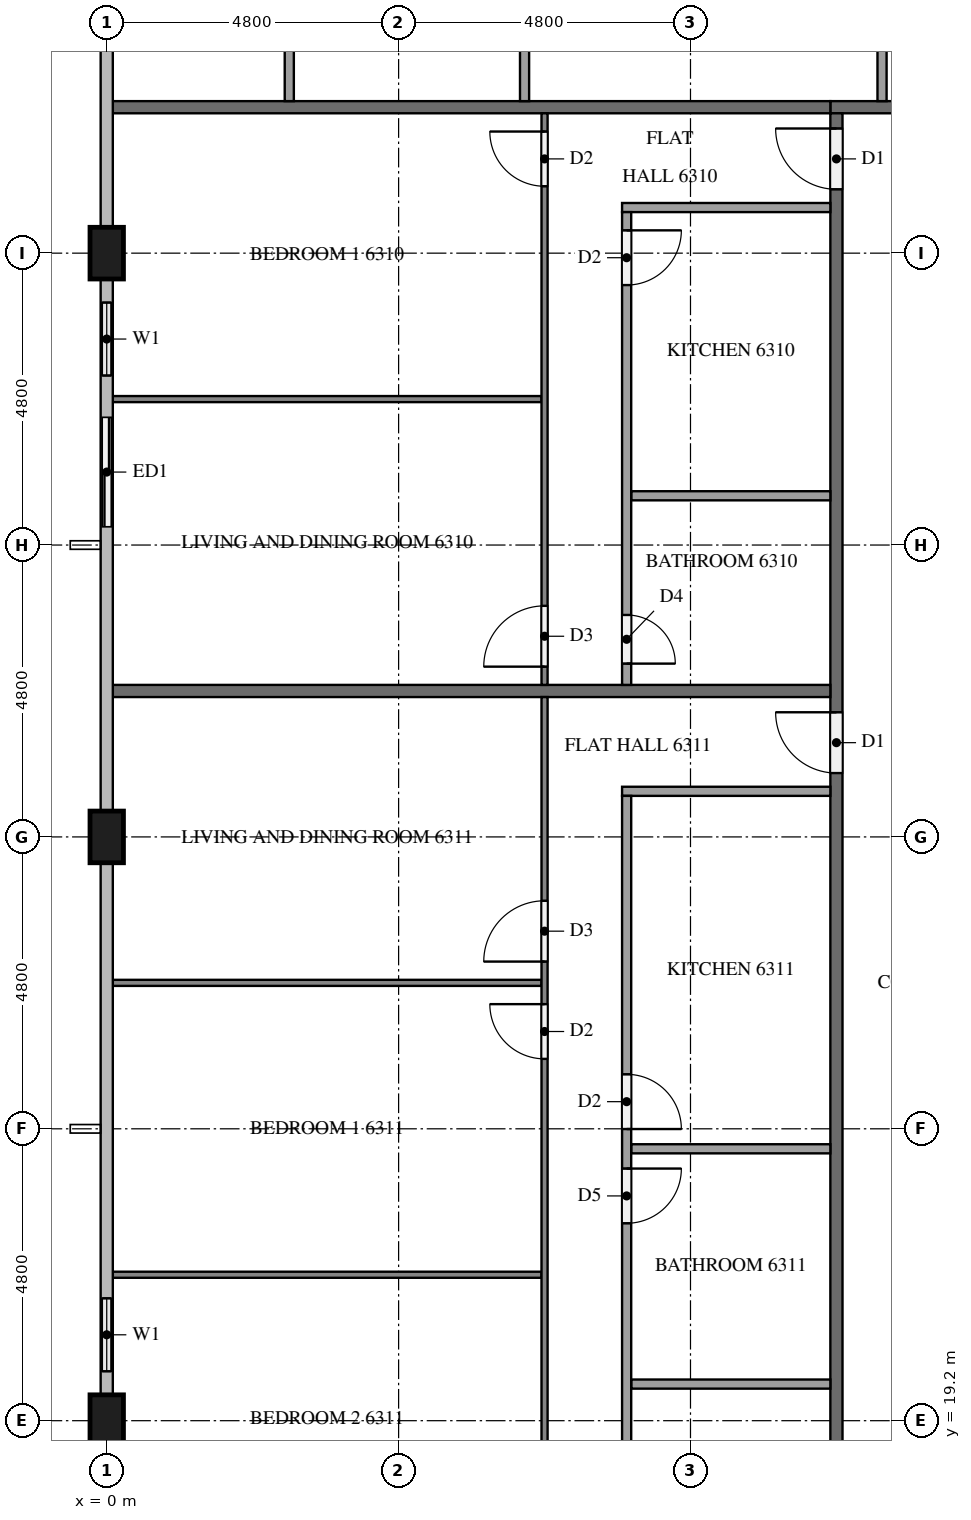
"""IFC4 building model, lengths in metres.
Left out: names, types, materials, properties, quantities, classifications, styles, units other than length and angle.
Written with IfcOpenShell. Run it as: python <this file> out.ifc"""

import sys

from ifc_helpers import new_model, si_unit, direction, frame, frame_2d, origin, origin_2d, place, context, subcontext, project, spatial, rectangle, extrude, element, fill, save


model = new_model("IFC4")
c1 = context("Model", 3, precision=1e-05, world=origin(), true_north=direction((0.0, 1.0)))
c2 = subcontext(c1, "Body", "Model", "MODEL_VIEW")
j1 = project(units=[si_unit("LENGTHUNIT", "METRE"), si_unit("PLANEANGLEUNIT", "RADIAN")], contexts=[c1])
p1 = place(None, origin())
s1 = spatial("IfcSite", under=j1, at=p1, CompositionType="ELEMENT")
p2 = place(p1, origin())
s2 = spatial("IfcBuilding", under=s1, at=p2, CompositionType="ELEMENT")
p3 = place(p2, frame((0.0, 0.0, 242.2)))
s3 = spatial("IfcBuildingStorey", under=s2, at=p3, CompositionType="ELEMENT", Elevation=242.2)
for number, where, z_axis, x_axis in (
    (1, (0.0, 38.4, 0.0), (0.0, 0.0, 1.0), (0.0, 1.0, 0.0)),
    (2, (0.0, 28.8, 0.0), (0.0, 0.0, 1.0), (0.0, 1.0, 0.0)),
    (3, (0.0, 19.2, 0.0), (0.0, 0.0, 1.0), (0.0, 1.0, 0.0)),
):
    element("IfcColumn", number, at=place(p3, frame(where, z_axis=z_axis, x_axis=x_axis)), inside=s3, PredefinedType="COLUMN", context=c2, shape_type="SweptSolid", body=[
        extrude(rectangle(XDim=0.85, YDim=0.55, at=origin_2d()), origin(), (0.0, 0.0, 1.0), 3.2),
    ])
p4 = place(p3, frame((0.0, 37.975, 0.0), z_axis=(0.0, 0.0, 1.0), x_axis=(0.0, -1.0, 0.0)))
e4 = element("IfcWall", 4, at=p4, inside=s3, PredefinedType="SOLIDWALL", context=c2, shape_type="SweptSolid", body=[
    extrude(rectangle(XDim=4.375, YDim=0.15, at=frame_2d((2.188, 0.0))), origin(), (0.0, 0.0, 1.0), 3.2),
])
p5 = place(p4, frame((0.387, 0.0, 0.9)))
e5 = element("IfcOpeningElement", 5, at=p5, cuts=e4, PredefinedType="OPENING", context=c2, shape_type="SweptSolid", body=[
    extrude(rectangle(XDim=1.2, YDim=1.4, at=frame_2d((0.6, 0.7))), frame((0.0, 0.085, 0.0), z_axis=(0.0, -1.0, 0.0), x_axis=(1.0, 0.0, 0.0)), (0.0, 0.0, 1.0), 0.17),
])
p6 = place(p4, frame((2.275, 0.0, 0.0)))
e6 = element("IfcOpeningElement", 6, at=p6, cuts=e4, PredefinedType="OPENING", context=c2, shape_type="SweptSolid", body=[
    extrude(rectangle(XDim=1.8, YDim=2.4, at=frame_2d((0.9, 1.2))), frame((0.0, 0.085, 0.0), z_axis=(0.0, -1.0, 0.0), x_axis=(1.0, 0.0, 0.0)), (0.0, 0.0, 1.0), 0.17),
])
p7 = place(p3, frame((0.0, 21.6, 0.0), z_axis=(0.0, 0.0, 1.0), x_axis=(0.0, -1.0, 0.0)))
e7 = element("IfcWall", 7, at=p7, inside=s3, PredefinedType="SOLIDWALL", context=c2, shape_type="SweptSolid", body=[
    extrude(rectangle(XDim=1.975, YDim=0.15, at=frame_2d((0.988, 0.0))), origin(), (0.0, 0.0, 1.0), 3.2),
])
p8 = place(p7, frame((0.387, 0.0, 0.9)))
e8 = element("IfcOpeningElement", 8, at=p8, cuts=e7, PredefinedType="OPENING", context=c2, shape_type="SweptSolid", body=[
    extrude(rectangle(XDim=1.2, YDim=1.4, at=frame_2d((0.6, 0.7))), frame((0.0, 0.085, 0.0), z_axis=(0.0, -1.0, 0.0), x_axis=(1.0, 0.0, 0.0)), (0.0, 0.0, 1.0), 0.17),
])
p9 = place(p3, frame((11.9, 40.8, 0.0), z_axis=(0.0, 0.0, 1.0), x_axis=(1.0, 0.0, 0.0)))
e9 = element("IfcWall", 9, at=p9, inside=s3, PredefinedType="PARTITIONING", context=c2, shape_type="SweptSolid", body=[
    extrude(rectangle(XDim=38.6, YDim=0.2, at=frame_2d((19.3, 0.0))), origin(), (0.0, 0.0, 1.0), 3.2),
])
p10 = place(p9, frame((34.05, 0.0, 0.0)))
e10 = element("IfcOpeningElement", 10, at=p10, cuts=e9, PredefinedType="OPENING", context=c2, shape_type="SweptSolid", body=[
    extrude(rectangle(XDim=1.0, YDim=2.1, at=frame_2d((0.5, 1.05))), frame((0.0, 0.11, 0.0), z_axis=(0.0, -1.0, 0.0), x_axis=(1.0, 0.0, 0.0)), (0.0, 0.0, 1.0), 0.22),
])
p11 = place(p9, frame((32.3, 0.0, 0.0)))
e11 = element("IfcOpeningElement", 11, at=p11, cuts=e9, PredefinedType="OPENING", context=c2, shape_type="SweptSolid", body=[
    extrude(rectangle(XDim=1.1, YDim=2.1, at=frame_2d((0.55, 1.05))), frame((0.0, 0.11, 0.0), z_axis=(0.0, -1.0, 0.0), x_axis=(1.0, 0.0, 0.0)), (0.0, 0.0, 1.0), 0.22),
])
p12 = place(p9, frame((2.85, 0.0, 0.0)))
e12 = element("IfcOpeningElement", 12, at=p12, cuts=e9, PredefinedType="OPENING", context=c2, shape_type="SweptSolid", body=[
    extrude(rectangle(XDim=1.0, YDim=2.1, at=frame_2d((0.5, 1.05))), frame((0.0, 0.11, 0.0), z_axis=(0.0, -1.0, 0.0), x_axis=(1.0, 0.0, 0.0)), (0.0, 0.0, 1.0), 0.22),
])
p13 = place(p9, frame((1.15, 0.0, 0.0)))
e13 = element("IfcOpeningElement", 13, at=p13, cuts=e9, PredefinedType="OPENING", context=c2, shape_type="SweptSolid", body=[
    extrude(rectangle(XDim=1.0, YDim=2.1, at=frame_2d((0.5, 1.05))), frame((0.0, 0.11, 0.0), z_axis=(0.0, -1.0, 0.0), x_axis=(1.0, 0.0, 0.0)), (0.0, 0.0, 1.0), 0.22),
])
p14 = place(p3, frame((12.0, 12.1, 0.0), z_axis=(0.0, 0.0, 1.0), x_axis=(0.0, 1.0, 0.0)))
e14 = element("IfcWall", 14, at=p14, inside=s3, PredefinedType="PARTITIONING", context=c2, shape_type="SweptSolid", body=[
    extrude(rectangle(XDim=28.6, YDim=0.2, at=frame_2d((14.3, 0.0))), origin(), (0.0, 0.0, 1.0), 3.2),
])
p15 = place(p14, frame((27.35, 0.0, 0.0)))
e15 = element("IfcOpeningElement", 15, at=p15, cuts=e14, PredefinedType="OPENING", context=c2, shape_type="SweptSolid", body=[
    extrude(rectangle(XDim=1.0, YDim=2.1, at=frame_2d((0.5, 1.05))), frame((0.0, 0.11, 0.0), z_axis=(0.0, -1.0, 0.0), x_axis=(1.0, 0.0, 0.0)), (0.0, 0.0, 1.0), 0.22),
])
p16 = place(p14, frame((17.75, 0.0, 0.0)))
e16 = element("IfcOpeningElement", 16, at=p16, cuts=e14, PredefinedType="OPENING", context=c2, shape_type="SweptSolid", body=[
    extrude(rectangle(XDim=1.0, YDim=2.1, at=frame_2d((0.5, 1.05))), frame((0.0, 0.11, 0.0), z_axis=(0.0, -1.0, 0.0), x_axis=(1.0, 0.0, 0.0)), (0.0, 0.0, 1.0), 0.22),
])
p17 = place(p14, frame((3.35, 0.0, 0.0)))
e17 = element("IfcOpeningElement", 17, at=p17, cuts=e14, PredefinedType="OPENING", context=c2, shape_type="SweptSolid", body=[
    extrude(rectangle(XDim=1.0, YDim=2.1, at=frame_2d((0.5, 1.05))), frame((0.0, 0.11, 0.0), z_axis=(0.0, -1.0, 0.0), x_axis=(1.0, 0.0, 0.0)), (0.0, 0.0, 1.0), 0.22),
])
for number, where, z_axis, x_axis in (
    (18, (0.1, 40.8, 0.0), (0.0, 0.0, 1.0), (1.0, 0.0, 0.0)),
    (19, (0.1, 31.2, 0.0), (0.0, 0.0, 1.0), (1.0, 0.0, 0.0)),
):
    element("IfcWall", number, at=place(p3, frame(where, z_axis=z_axis, x_axis=x_axis)), inside=s3, PredefinedType="PARTITIONING", context=c2, shape_type="SweptSolid", body=[
        extrude(rectangle(XDim=11.8, YDim=0.2, at=frame_2d((5.9, 0.0))), origin(), (0.0, 0.0, 1.0), 3.2),
    ])
for number, where, z_axis, x_axis in (
    (20, (6.871, 40.9, 0.0), (0.0, 0.0, 1.0), (0.0, 1.0, 0.0)),
    (21, (3.002, 40.9, 0.0), (0.0, 0.0, 1.0), (0.0, 1.0, 0.0)),
):
    element("IfcWall", number, at=place(p3, frame(where, z_axis=z_axis, x_axis=x_axis)), inside=s3, PredefinedType="PARTITIONING", context=c2, shape_type="SweptSolid", body=[
        extrude(rectangle(XDim=3.575, YDim=0.15, at=frame_2d((1.788, 0.0))), origin(), (0.0, 0.0, 1.0), 3.2),
    ])
p18 = place(p3, frame((12.75, 40.9, 0.0), z_axis=(0.0, 0.0, 1.0), x_axis=(0.0, 1.0, 0.0)))
e22 = element("IfcWall", 22, at=p18, inside=s3, PredefinedType="PARTITIONING", context=c2, shape_type="SweptSolid", body=[
    extrude(rectangle(XDim=3.725, YDim=0.15, at=frame_2d((1.863, 0.0))), origin(), (0.0, 0.0, 1.0), 3.2),
])
p19 = place(p3, frame((7.15, 36.0, 0.0), z_axis=(0.0, 0.0, 1.0), x_axis=(-1.0, 0.0, 0.0)))
e23 = element("IfcWall", 23, at=p19, inside=s3, PredefinedType="PARTITIONING", context=c2, shape_type="SweptSolid", body=[
    extrude(rectangle(XDim=7.05, YDim=0.1, at=frame_2d((3.525, 0.0))), origin(), (0.0, 0.0, 1.0), 3.2),
])
p20 = place(p3, frame((7.2, 31.3, 0.0), z_axis=(0.0, 0.0, 1.0), x_axis=(0.0, 1.0, 0.0)))
e24 = element("IfcWall", 24, at=p20, inside=s3, PredefinedType="PARTITIONING", context=c2, shape_type="SweptSolid", body=[
    extrude(rectangle(XDim=9.4, YDim=0.1, at=frame_2d((4.7, 0.0))), origin(), (0.0, 0.0, 1.0), 3.2),
])
p21 = place(p20, frame((8.2, 0.0, 0.0)))
e25 = element("IfcOpeningElement", 25, at=p21, cuts=e24, PredefinedType="OPENING", context=c2, shape_type="SweptSolid", body=[
    extrude(rectangle(XDim=0.9, YDim=2.1, at=frame_2d((0.45, 1.05))), frame((0.0, 0.06, 0.0), z_axis=(0.0, -1.0, 0.0), x_axis=(1.0, 0.0, 0.0)), (0.0, 0.0, 1.0), 0.12),
])
p22 = place(p20, frame((0.3, 0.0, 0.0)))
e26 = element("IfcOpeningElement", 26, at=p22, cuts=e24, PredefinedType="OPENING", context=c2, shape_type="SweptSolid", body=[
    extrude(rectangle(XDim=1.0, YDim=2.1, at=frame_2d((0.5, 1.05))), frame((0.0, 0.06, 0.0), z_axis=(0.0, -1.0, 0.0), x_axis=(1.0, 0.0, 0.0)), (0.0, 0.0, 1.0), 0.12),
])
p23 = place(p3, frame((11.9, 34.41, 0.0), z_axis=(0.0, 0.0, 1.0), x_axis=(-1.0, 0.0, 0.0)))
e27 = element("IfcWall", 27, at=p23, inside=s3, PredefinedType="PARTITIONING", context=c2, shape_type="SweptSolid", body=[
    extrude(rectangle(XDim=3.275, YDim=0.15, at=frame_2d((1.637, 0.0))), origin(), (0.0, 0.0, 1.0), 3.2),
])
p24 = place(p3, frame((11.9, 39.15, 0.0), z_axis=(0.0, 0.0, 1.0), x_axis=(-1.0, 0.0, 0.0)))
e28 = element("IfcWall", 28, at=p24, inside=s3, PredefinedType="PARTITIONING", context=c2, shape_type="SweptSolid", body=[
    extrude(rectangle(XDim=3.425, YDim=0.15, at=frame_2d((1.712, 0.0))), origin(), (0.0, 0.0, 1.0), 3.2),
])
p25 = place(p3, frame((8.55, 39.075, 0.0), z_axis=(0.0, 0.0, 1.0), x_axis=(0.0, -1.0, 0.0)))
e29 = element("IfcWall", 29, at=p25, inside=s3, PredefinedType="PARTITIONING", context=c2, shape_type="SweptSolid", body=[
    extrude(rectangle(XDim=7.775, YDim=0.15, at=frame_2d((3.887, 0.0))), origin(), (0.0, 0.0, 1.0), 3.2),
])
p26 = place(p25, frame((0.3, 0.0, 0.0)))
e30 = element("IfcOpeningElement", 30, at=p26, cuts=e29, PredefinedType="OPENING", context=c2, shape_type="SweptSolid", body=[
    extrude(rectangle(XDim=0.9, YDim=2.1, at=frame_2d((0.45, 1.05))), frame((0.0, 0.085, 0.0), z_axis=(0.0, -1.0, 0.0), x_axis=(1.0, 0.0, 0.0)), (0.0, 0.0, 1.0), 0.17),
])
p27 = place(p25, frame((6.625, 0.0, 0.0)))
e31 = element("IfcOpeningElement", 31, at=p27, cuts=e29, PredefinedType="OPENING", context=c2, shape_type="SweptSolid", body=[
    extrude(rectangle(XDim=0.8, YDim=2.1, at=frame_2d((0.4, 1.05))), frame((0.0, 0.085, 0.0), z_axis=(0.0, -1.0, 0.0), x_axis=(1.0, 0.0, 0.0)), (0.0, 0.0, 1.0), 0.17),
])
for number, where, z_axis, x_axis in (
    (32, (7.15, 26.4, 0.0), (0.0, 0.0, 1.0), (-1.0, 0.0, 0.0)),
    (33, (7.15, 21.6, 0.0), (0.0, 0.0, 1.0), (-1.0, 0.0, 0.0)),
):
    element("IfcWall", number, at=place(p3, frame(where, z_axis=z_axis, x_axis=x_axis)), inside=s3, PredefinedType="PARTITIONING", context=c2, shape_type="SweptSolid", body=[
        extrude(rectangle(XDim=7.05, YDim=0.1, at=frame_2d((3.525, 0.0))), origin(), (0.0, 0.0, 1.0), 3.2),
    ])
p28 = place(p3, frame((7.2, 16.9, 0.0), z_axis=(0.0, 0.0, 1.0), x_axis=(0.0, 1.0, 0.0)))
e34 = element("IfcWall", 34, at=p28, inside=s3, PredefinedType="PARTITIONING", context=c2, shape_type="SweptSolid", body=[
    extrude(rectangle(XDim=14.2, YDim=0.1, at=frame_2d((7.1, 0.0))), origin(), (0.0, 0.0, 1.0), 3.2),
])
p29 = place(p28, frame((9.85, 0.0, 0.0)))
e35 = element("IfcOpeningElement", 35, at=p29, cuts=e34, PredefinedType="OPENING", context=c2, shape_type="SweptSolid", body=[
    extrude(rectangle(XDim=1.0, YDim=2.1, at=frame_2d((0.5, 1.05))), frame((0.0, 0.06, 0.0), z_axis=(0.0, -1.0, 0.0), x_axis=(1.0, 0.0, 0.0)), (0.0, 0.0, 1.0), 0.12),
])
p30 = place(p28, frame((8.25, 0.0, 0.0)))
e36 = element("IfcOpeningElement", 36, at=p30, cuts=e34, PredefinedType="OPENING", context=c2, shape_type="SweptSolid", body=[
    extrude(rectangle(XDim=0.9, YDim=2.1, at=frame_2d((0.45, 1.05))), frame((0.0, 0.06, 0.0), z_axis=(0.0, -1.0, 0.0), x_axis=(1.0, 0.0, 0.0)), (0.0, 0.0, 1.0), 0.12),
])
p31 = place(p28, frame((0.3, 0.0, 0.0)))
e37 = element("IfcOpeningElement", 37, at=p31, cuts=e34, PredefinedType="OPENING", context=c2, shape_type="SweptSolid", body=[
    extrude(rectangle(XDim=0.9, YDim=2.1, at=frame_2d((0.45, 1.05))), frame((0.0, 0.06, 0.0), z_axis=(0.0, -1.0, 0.0), x_axis=(1.0, 0.0, 0.0)), (0.0, 0.0, 1.0), 0.12),
])
for number, where, z_axis, x_axis in (
    (38, (11.9, 23.671, 0.0), (0.0, 0.0, 1.0), (-1.0, 0.0, 0.0)),
    (39, (11.9, 19.802, 0.0), (0.0, 0.0, 1.0), (-1.0, 0.0, 0.0)),
):
    element("IfcWall", number, at=place(p3, frame(where, z_axis=z_axis, x_axis=x_axis)), inside=s3, PredefinedType="PARTITIONING", context=c2, shape_type="SweptSolid", body=[
        extrude(rectangle(XDim=3.275, YDim=0.15, at=frame_2d((1.637, 0.0))), origin(), (0.0, 0.0, 1.0), 3.2),
    ])
p32 = place(p3, frame((11.9, 29.55, 0.0), z_axis=(0.0, 0.0, 1.0), x_axis=(-1.0, 0.0, 0.0)))
e40 = element("IfcWall", 40, at=p32, inside=s3, PredefinedType="PARTITIONING", context=c2, shape_type="SweptSolid", body=[
    extrude(rectangle(XDim=3.425, YDim=0.15, at=frame_2d((1.712, 0.0))), origin(), (0.0, 0.0, 1.0), 3.2),
])
p33 = place(p3, frame((8.55, 29.475, 0.0), z_axis=(0.0, 0.0, 1.0), x_axis=(0.0, -1.0, 0.0)))
e41 = element("IfcWall", 41, at=p33, inside=s3, PredefinedType="PARTITIONING", context=c2, shape_type="SweptSolid", body=[
    extrude(rectangle(XDim=12.575, YDim=0.15, at=frame_2d((6.288, 0.0))), origin(), (0.0, 0.0, 1.0), 3.2),
])
p34 = place(p33, frame((4.579, 0.0, 0.0)))
e42 = element("IfcOpeningElement", 42, at=p34, cuts=e41, PredefinedType="OPENING", context=c2, shape_type="SweptSolid", body=[
    extrude(rectangle(XDim=0.9, YDim=2.1, at=frame_2d((0.45, 1.05))), frame((0.0, 0.085, 0.0), z_axis=(0.0, -1.0, 0.0), x_axis=(1.0, 0.0, 0.0)), (0.0, 0.0, 1.0), 0.17),
])
p35 = place(p33, frame((6.129, 0.0, 0.0)))
e43 = element("IfcOpeningElement", 43, at=p35, cuts=e41, PredefinedType="OPENING", context=c2, shape_type="SweptSolid", body=[
    extrude(rectangle(XDim=0.9, YDim=2.1, at=frame_2d((0.45, 1.05))), frame((0.0, 0.085, 0.0), z_axis=(0.0, -1.0, 0.0), x_axis=(1.0, 0.0, 0.0)), (0.0, 0.0, 1.0), 0.17),
])
p36 = place(p33, frame((11.425, 0.0, 0.0)))
e44 = element("IfcOpeningElement", 44, at=p36, cuts=e41, PredefinedType="OPENING", context=c2, shape_type="SweptSolid", body=[
    extrude(rectangle(XDim=0.8, YDim=2.1, at=frame_2d((0.4, 1.05))), frame((0.0, 0.085, 0.0), z_axis=(0.0, -1.0, 0.0), x_axis=(1.0, 0.0, 0.0)), (0.0, 0.0, 1.0), 0.17),
])
p37 = place(p5, origin())
e45 = element("IfcWindow", 45, at=p37, inside=s3, PartitioningType="SINGLE_PANEL", PredefinedType="WINDOW", context=c2, shape_type="SweptSolid", body=[
    extrude(rectangle(XDim=1.2, YDim=1.4, at=frame_2d((0.6, 0.7))), frame((0.0, 0.03, 0.0), z_axis=(0.0, -1.0, 0.0), x_axis=(1.0, 0.0, 0.0)), (0.0, 0.0, 1.0), 0.06),
])
fill(e5, e45)
p38 = place(p6, origin())
e46 = element("IfcDoor", 46, at=p38, inside=s3, OperationType="SLIDING_TO_LEFT", PredefinedType="DOOR", context=c2, shape_type="SweptSolid", body=[
    extrude(rectangle(XDim=1.8, YDim=2.4, at=frame_2d((0.9, 1.2))), frame((0.0, 0.025, 0.0), z_axis=(0.0, -1.0, 0.0), x_axis=(1.0, 0.0, 0.0)), (0.0, 0.0, 1.0), 0.05),
])
fill(e6, e46)
p39 = place(p8, origin())
e47 = element("IfcWindow", 47, at=p39, inside=s3, PartitioningType="SINGLE_PANEL", PredefinedType="WINDOW", context=c2, shape_type="SweptSolid", body=[
    extrude(rectangle(XDim=1.2, YDim=1.4, at=frame_2d((0.6, 0.7))), frame((0.0, 0.03, 0.0), z_axis=(0.0, -1.0, 0.0), x_axis=(1.0, 0.0, 0.0)), (0.0, 0.0, 1.0), 0.06),
])
fill(e8, e47)
p40 = place(p15, origin())
e48 = element("IfcDoor", 48, at=p40, inside=s3, OperationType="SINGLE_SWING_RIGHT", PredefinedType="DOOR", context=c2, shape_type="SweptSolid", body=[
    extrude(rectangle(XDim=1.0, YDim=2.1, at=frame_2d((0.5, 1.05))), frame((0.0, 0.025, 0.0), z_axis=(0.0, -1.0, 0.0), x_axis=(1.0, 0.0, 0.0)), (0.0, 0.0, 1.0), 0.05),
])
fill(e15, e48)
p41 = place(p16, origin())
e49 = element("IfcDoor", 49, at=p41, inside=s3, OperationType="SINGLE_SWING_RIGHT", PredefinedType="DOOR", context=c2, shape_type="SweptSolid", body=[
    extrude(rectangle(XDim=1.0, YDim=2.1, at=frame_2d((0.5, 1.05))), frame((0.0, 0.025, 0.0), z_axis=(0.0, -1.0, 0.0), x_axis=(1.0, 0.0, 0.0)), (0.0, 0.0, 1.0), 0.05),
])
fill(e16, e49)
p42 = place(p21, origin())
e50 = element("IfcDoor", 50, at=p42, inside=s3, OperationType="SINGLE_SWING_RIGHT", PredefinedType="DOOR", context=c2, shape_type="SweptSolid", body=[
    extrude(rectangle(XDim=0.9, YDim=2.1, at=frame_2d((0.45, 1.05))), frame((0.0, 0.025, 0.0), z_axis=(0.0, -1.0, 0.0), x_axis=(1.0, 0.0, 0.0)), (0.0, 0.0, 1.0), 0.05),
])
fill(e25, e50)
p43 = place(p22, origin())
e51 = element("IfcDoor", 51, at=p43, inside=s3, OperationType="SINGLE_SWING_LEFT", PredefinedType="DOOR", context=c2, shape_type="SweptSolid", body=[
    extrude(rectangle(XDim=1.0, YDim=2.1, at=frame_2d((0.5, 1.05))), frame((0.0, 0.025, 0.0), z_axis=(0.0, -1.0, 0.0), x_axis=(1.0, 0.0, 0.0)), (0.0, 0.0, 1.0), 0.05),
])
fill(e26, e51)
p44 = place(p26, origin())
e52 = element("IfcDoor", 52, at=p44, inside=s3, OperationType="SINGLE_SWING_LEFT", PredefinedType="DOOR", context=c2, shape_type="SweptSolid", body=[
    extrude(rectangle(XDim=0.9, YDim=2.1, at=frame_2d((0.45, 1.05))), frame((0.0, 0.025, 0.0), z_axis=(0.0, -1.0, 0.0), x_axis=(1.0, 0.0, 0.0)), (0.0, 0.0, 1.0), 0.05),
])
fill(e30, e52)
p45 = place(p27, origin())
e53 = element("IfcDoor", 53, at=p45, inside=s3, OperationType="SINGLE_SWING_RIGHT", PredefinedType="DOOR", context=c2, shape_type="SweptSolid", body=[
    extrude(rectangle(XDim=0.8, YDim=2.1, at=frame_2d((0.4, 1.05))), frame((0.0, 0.025, 0.0), z_axis=(0.0, -1.0, 0.0), x_axis=(1.0, 0.0, 0.0)), (0.0, 0.0, 1.0), 0.05),
])
fill(e31, e53)
p46 = place(p29, origin())
e54 = element("IfcDoor", 54, at=p46, inside=s3, OperationType="SINGLE_SWING_LEFT", PredefinedType="DOOR", context=c2, shape_type="SweptSolid", body=[
    extrude(rectangle(XDim=1.0, YDim=2.1, at=frame_2d((0.5, 1.05))), frame((0.0, 0.025, 0.0), z_axis=(0.0, -1.0, 0.0), x_axis=(1.0, 0.0, 0.0)), (0.0, 0.0, 1.0), 0.05),
])
fill(e35, e54)
p47 = place(p30, origin())
e55 = element("IfcDoor", 55, at=p47, inside=s3, OperationType="SINGLE_SWING_RIGHT", PredefinedType="DOOR", context=c2, shape_type="SweptSolid", body=[
    extrude(rectangle(XDim=0.9, YDim=2.1, at=frame_2d((0.45, 1.05))), frame((0.0, 0.025, 0.0), z_axis=(0.0, -1.0, 0.0), x_axis=(1.0, 0.0, 0.0)), (0.0, 0.0, 1.0), 0.05),
])
fill(e36, e55)
p48 = place(p34, origin())
e56 = element("IfcDoor", 56, at=p48, inside=s3, OperationType="SINGLE_SWING_RIGHT", PredefinedType="DOOR", context=c2, shape_type="SweptSolid", body=[
    extrude(rectangle(XDim=0.9, YDim=2.1, at=frame_2d((0.45, 1.05))), frame((0.0, 0.025, 0.0), z_axis=(0.0, -1.0, 0.0), x_axis=(1.0, 0.0, 0.0)), (0.0, 0.0, 1.0), 0.05),
])
fill(e42, e56)
p49 = place(p35, origin())
e57 = element("IfcDoor", 57, at=p49, inside=s3, OperationType="SINGLE_SWING_LEFT", PredefinedType="DOOR", context=c2, shape_type="SweptSolid", body=[
    extrude(rectangle(XDim=0.9, YDim=2.1, at=frame_2d((0.45, 1.05))), frame((0.0, 0.025, 0.0), z_axis=(0.0, -1.0, 0.0), x_axis=(1.0, 0.0, 0.0)), (0.0, 0.0, 1.0), 0.05),
])
fill(e43, e57)
save(model, sys.argv[1])
